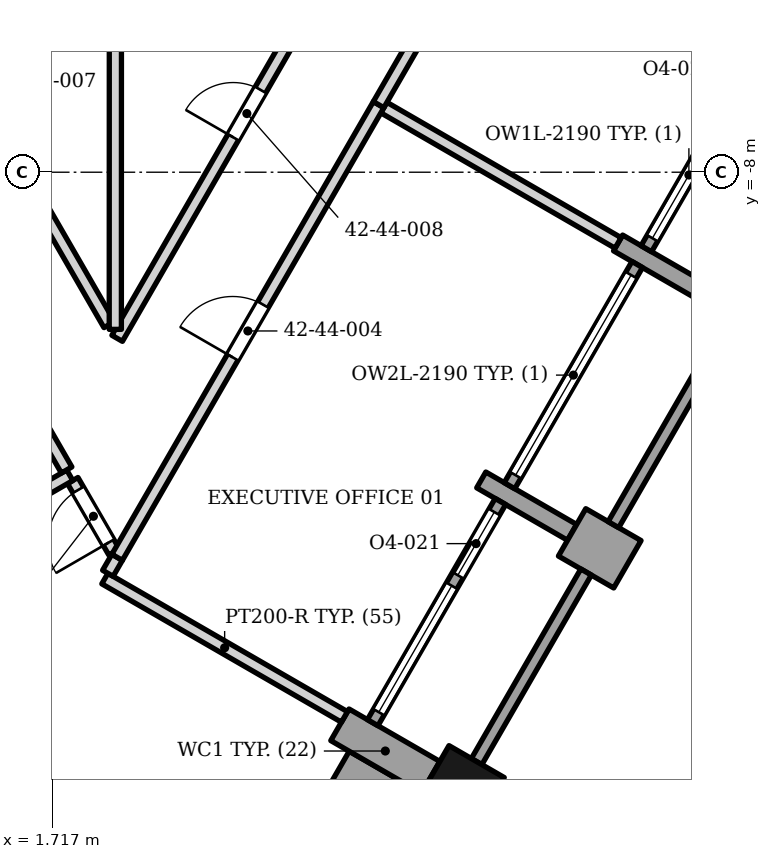
"""IFC4 building model, lengths in metres.
Left out: names, types, materials, properties, quantities, classifications, styles, units other than length and angle.
Written with IfcOpenShell. Run it as: python <this file> out.ifc"""

import sys

from ifc_helpers import new_model, si_unit, direction, frame, frame_2d, origin, origin_2d, place, context, subcontext, project, spatial, rectangle, extrude, element, fill, save


model = new_model("IFC4")
c1 = context("Model", 3, precision=1e-05, world=origin(), true_north=direction((0.0, 1.0)))
c2 = subcontext(c1, "Body", "Model", "MODEL_VIEW")
j1 = project(units=[si_unit("LENGTHUNIT", "METRE"), si_unit("PLANEANGLEUNIT", "RADIAN")], contexts=[c1])
p1 = place(None, origin())
s1 = spatial("IfcSite", under=j1, at=p1, CompositionType="ELEMENT")
p2 = place(p1, origin())
s2 = spatial("IfcBuilding", under=s1, at=p2, CompositionType="ELEMENT")
p3 = place(p2, frame((0.0, 0.0, 179.7)))
s3 = spatial("IfcBuildingStorey", under=s2, at=p3, CompositionType="ELEMENT", Elevation=179.7)
p4 = place(p3, frame((8.472, -18.082, 0.0), z_axis=(0.0, 0.0, 1.0), x_axis=(0.5, 0.866025403784, 0.0)))
e1 = element("IfcColumn", 1, at=p4, inside=s3, PredefinedType="COLUMN", context=c2, shape_type="SweptSolid", body=[
    extrude(rectangle(XDim=0.9, YDim=1.05, at=origin_2d()), origin(), (0.0, 0.0, 1.0), 3.9),
])
p5 = place(p3, frame((7.942, -17.95, 0.0), z_axis=(0.0, 0.0, 1.0), x_axis=(-0.866013532718, 0.500020560727, 0.0)))
e2 = element("IfcWall", 2, at=p5, inside=s3, PredefinedType="SOLIDWALL", context=c2, shape_type="SweptSolid", body=[
    extrude(rectangle(XDim=1.725, YDim=0.6, at=frame_2d((0.863, 0.0))), origin(), (0.0, 0.0, 1.0), 3.0),
])
p6 = place(p3, frame((11.176, -14.448, 0.0), z_axis=(0.0, 0.0, 1.0), x_axis=(-0.866030680601, 0.499990860175, 0.0)))
e3 = element("IfcWall", 3, at=p6, inside=s3, PredefinedType="SOLIDWALL", context=c2, shape_type="SweptSolid", body=[
    extrude(rectangle(XDim=1.05, YDim=0.9, at=frame_2d((0.525, 0.0))), origin(), (0.0, 0.0, 1.0), 3.0),
])
p7 = place(p3, frame((10.267, -13.923, 0.0), z_axis=(0.0, 0.0, 1.0), x_axis=(-0.866013532718, 0.500020560727, 0.0)))
e4 = element("IfcWall", 4, at=p7, inside=s3, PredefinedType="SOLIDWALL", context=c2, shape_type="SweptSolid", body=[
    extrude(rectangle(XDim=1.725, YDim=0.3, at=frame_2d((0.863, 0.0))), origin(), (0.0, 0.0, 1.0), 3.0),
])
p8 = place(p3, frame((12.517, -10.026, 0.0), z_axis=(0.0, 0.0, 1.0), x_axis=(-0.866013532718, 0.500020560727, 0.0)))
e5 = element("IfcWall", 5, at=p8, inside=s3, PredefinedType="SOLIDWALL", context=c2, shape_type="SweptSolid", body=[
    extrude(rectangle(XDim=1.725, YDim=0.3, at=frame_2d((0.863, 0.0))), origin(), (0.0, 0.0, 1.0), 2.742),
])
p9 = place(p3, frame((8.697, -17.693, 0.0), z_axis=(0.0, 0.0, 1.0), x_axis=(0.499961193289, 0.866047807691, 0.0)))
e6 = element("IfcWall", 6, at=p9, inside=s3, PredefinedType="SOLIDWALL", context=c2, shape_type="SweptSolid", body=[
    extrude(rectangle(XDim=3.6, YDim=0.2, at=frame_2d((1.8, 0.0))), origin(), (0.0, 0.0, 1.0), 3.0),
])
p10 = place(p3, frame((6.988, -17.052, 0.0), z_axis=(0.0, 0.0, 1.0), x_axis=(0.500027713859, 0.866009402589, 0.0)))
e7 = element("IfcWall", 7, at=p10, inside=s3, PredefinedType="ELEMENTEDWALL", context=c2, shape_type="SweptSolid", body=[
    extrude(rectangle(XDim=4.2, YDim=0.2, at=frame_2d((2.1, 0.0))), origin(), (0.0, 0.0, 1.0), 3.0),
])
p11 = place(p10, frame((0.2, 0.0, 0.45)))
e8 = element("IfcOpeningElement", 8, at=p11, cuts=e7, PredefinedType="OPENING", context=c2, shape_type="SweptSolid", body=[
    extrude(rectangle(XDim=2.4, YDim=2.25, at=frame_2d((1.2, 1.125))), frame((0.0, 0.11, 0.0), z_axis=(0.0, -1.0, 0.0), x_axis=(1.0, 0.0, 0.0)), (0.0, 0.0, 1.0), 0.22),
])
p12 = place(p10, frame((2.8, 0.0, 0.0)))
e9 = element("IfcOpeningElement", 9, at=p12, cuts=e7, PredefinedType="OPENING", context=c2, shape_type="SweptSolid", body=[
    extrude(rectangle(XDim=1.2, YDim=2.7, at=frame_2d((0.6, 1.35))), frame((0.0, 0.11, 0.0), z_axis=(0.0, -1.0, 0.0), x_axis=(1.0, 0.0, 0.0)), (0.0, 0.0, 1.0), 0.22),
])
p13 = place(p3, frame((10.947, -13.795, 0.0), z_axis=(0.0, 0.0, 1.0), x_axis=(0.499961193289, 0.866047807691, 0.0)))
e10 = element("IfcWall", 10, at=p13, inside=s3, PredefinedType="SOLIDWALL", context=c2, shape_type="SweptSolid", body=[
    extrude(rectangle(XDim=3.6, YDim=0.2, at=frame_2d((1.8, 0.0))), origin(), (0.0, 0.0, 1.0), 3.0),
])
p14 = place(p3, frame((9.238, -13.155, 0.0), z_axis=(0.0, 0.0, 1.0), x_axis=(0.500002543286, 0.866023935413, 0.0)))
e11 = element("IfcWall", 11, at=p14, inside=s3, PredefinedType="ELEMENTEDWALL", context=c2, shape_type="SweptSolid", body=[
    extrude(rectangle(XDim=4.2, YDim=0.2, at=frame_2d((2.1, 0.0))), origin(), (0.0, 0.0, 1.0), 2.742),
])
p15 = place(p14, frame((0.2, 0.0, 0.45)))
e12 = element("IfcOpeningElement", 12, at=p15, cuts=e11, PredefinedType="OPENING", context=c2, shape_type="SweptSolid", body=[
    extrude(rectangle(XDim=3.8, YDim=2.19, at=frame_2d((1.9, 1.095))), frame((0.0, 0.11, 0.0), z_axis=(0.0, -1.0, 0.0), x_axis=(1.0, 0.0, 0.0)), (0.0, 0.0, 1.0), 0.22),
])
p16 = place(p3, frame((11.488, -9.258, 0.0), z_axis=(0.0, 0.0, 1.0), x_axis=(0.500027713859, 0.866009402589, 0.0)))
e13 = element("IfcWall", 13, at=p16, inside=s3, PredefinedType="ELEMENTEDWALL", context=c2, shape_type="SweptSolid", body=[
    extrude(rectangle(XDim=4.2, YDim=0.2, at=frame_2d((2.1, 0.0))), origin(), (0.0, 0.0, 1.0), 2.742),
])
p17 = place(p16, frame((0.2, 0.0, 0.45)))
e14 = element("IfcOpeningElement", 14, at=p17, cuts=e13, PredefinedType="OPENING", context=c2, shape_type="SweptSolid", body=[
    extrude(rectangle(XDim=2.4, YDim=2.19, at=frame_2d((1.2, 1.095))), frame((0.0, 0.11, 0.0), z_axis=(0.0, -1.0, 0.0), x_axis=(1.0, 0.0, 0.0)), (0.0, 0.0, 1.0), 0.22),
])
p18 = place(p16, frame((2.8, 0.0, 0.0)))
e15 = element("IfcOpeningElement", 15, at=p18, cuts=e13, PredefinedType="OPENING", context=c2, shape_type="SweptSolid", body=[
    extrude(rectangle(XDim=1.2, YDim=2.64, at=frame_2d((0.6, 1.32))), frame((0.0, 0.11, 0.0), z_axis=(0.0, -1.0, 0.0), x_axis=(1.0, 0.0, 0.0)), (0.0, 0.0, 1.0), 0.22),
])
p19 = place(p3, frame((8.489, -19.102, 0.0), z_axis=(0.0, 0.0, 1.0), x_axis=(-0.866041403502, 0.499972286653, 0.0)))
e16 = element("IfcWall", 16, at=p19, inside=s3, PredefinedType="SOLIDWALL", context=c2, shape_type="SweptSolid", body=[
    extrude(rectangle(XDim=2.425, YDim=0.85, at=frame_2d((1.212, 0.0))), origin(), (0.0, 0.0, 1.0), 3.0),
])
p20 = place(p3, frame((2.583, -14.683, 0.0), z_axis=(0.0, 0.0, 1.0), x_axis=(0.866012237902, -0.500022803284, 0.0)))
e17 = element("IfcWall", 17, at=p20, inside=s3, PredefinedType="PARTITIONING", context=c2, shape_type="SweptSolid", body=[
    extrude(rectangle(XDim=4.55, YDim=0.2, at=frame_2d((2.275, 0.0))), origin(), (0.0, 0.0, 1.0), 2.884),
])
p21 = place(p3, frame((2.632, -14.596, 0.0), z_axis=(0.0, 0.0, 1.0), x_axis=(0.499074005857, 0.866559367082, 0.0)))
e18 = element("IfcWall", 18, at=p21, inside=s3, PredefinedType="PARTITIONING", context=c2, shape_type="SweptSolid", body=[
    extrude(rectangle(XDim=0.304, YDim=0.2, at=frame_2d((0.152, 0.0))), origin(), (0.0, 0.0, 1.0), 3.73),
])
p22 = place(p3, frame((2.054, -13.07, 0.0), z_axis=(0.0, 0.0, 1.0), x_axis=(0.500759821175, -0.865586276172, 0.0)))
e19 = element("IfcWall", 19, at=p22, inside=s3, PredefinedType="PARTITIONING", context=c2, shape_type="SweptSolid", body=[
    extrude(rectangle(XDim=1.358, YDim=0.2, at=frame_2d((0.679, 0.0))), origin(), (0.0, 0.0, 1.0), 2.884),
])
p23 = place(p22, frame((0.179, 0.0, 0.0)))
e20 = element("IfcOpeningElement", 20, at=p23, cuts=e19, PredefinedType="OPENING", context=c2, shape_type="SweptSolid", body=[
    extrude(rectangle(XDim=1.0, YDim=2.1, at=frame_2d((0.5, 1.05))), frame((0.0, 0.11, 0.0), z_axis=(0.0, -1.0, 0.0), x_axis=(1.0, 0.0, 0.0)), (0.0, 0.0, 1.0), 0.22),
])
p24 = place(p3, frame((-4.879, -16.958, 0.0), z_axis=(0.0, 0.0, 1.0), x_axis=(0.866110929286, 0.499851836219, 0.0)))
e21 = element("IfcWall", 21, at=p24, inside=s3, PredefinedType="PARTITIONING", context=c2, shape_type="SweptSolid", body=[
    extrude(rectangle(XDim=7.95, YDim=0.2, at=frame_2d((3.975, 0.0))), origin(), (0.0, 0.0, 1.0), 2.884),
])
p25 = place(p3, frame((2.785, -10.732, 0.0), z_axis=(0.0, 0.0, 1.0), x_axis=(0.499820110187, 0.866129238309, 0.0)))
e22 = element("IfcWall", 22, at=p25, inside=s3, PredefinedType="PARTITIONING", context=c2, shape_type="SweptSolid", body=[
    extrude(rectangle(XDim=16.664, YDim=0.2, at=frame_2d((8.332, 0.0))), origin(), (0.0, 0.0, 1.0), 2.742),
])
p26 = place(p25, frame((3.818, 0.0, 0.0)))
e23 = element("IfcOpeningElement", 23, at=p26, cuts=e22, PredefinedType="OPENING", context=c2, shape_type="SweptSolid", body=[
    extrude(rectangle(XDim=0.9, YDim=2.1, at=frame_2d((0.45, 1.05))), frame((0.0, 0.11, 0.0), z_axis=(0.0, -1.0, 0.0), x_axis=(1.0, 0.0, 0.0)), (0.0, 0.0, 1.0), 0.22),
])
p27 = place(p25, frame((12.1, 0.0, 0.0)))
e24 = element("IfcOpeningElement", 24, at=p27, cuts=e22, PredefinedType="OPENING", context=c2, shape_type="SweptSolid", body=[
    extrude(rectangle(XDim=1.0, YDim=2.1, at=frame_2d((0.5, 1.05))), frame((0.0, 0.11, 0.0), z_axis=(0.0, -1.0, 0.0), x_axis=(1.0, 0.0, 0.0)), (0.0, 0.0, 1.0), 0.22),
])
p28 = place(p3, frame((-0.245, -9.088, 0.0), z_axis=(0.0, 0.0, 1.0), x_axis=(0.500013981145, -0.866017331616, 0.0)))
e25 = element("IfcWall", 25, at=p28, inside=s3, PredefinedType="PARTITIONING", context=c2, shape_type="SweptSolid", body=[
    extrude(rectangle(XDim=4.398, YDim=0.2, at=frame_2d((2.199, 0.0))), origin(), (0.0, 0.0, 1.0), 2.742),
])
p29 = place(p28, frame((0.871, 0.0, 0.0)))
e26 = element("IfcOpeningElement", 26, at=p29, cuts=e25, PredefinedType="OPENING", context=c2, shape_type="SweptSolid", body=[
    extrude(rectangle(XDim=0.9, YDim=2.1, at=frame_2d((0.45, 1.05))), frame((0.0, 0.11, 0.0), z_axis=(0.0, -1.0, 0.0), x_axis=(1.0, 0.0, 0.0)), (0.0, 0.0, 1.0), 0.22),
])
p30 = place(p3, frame((7.17, -6.936, 0.0), z_axis=(0.0, 0.0, 1.0), x_axis=(0.865815424907, -0.500363517848, 0.0)))
e27 = element("IfcWall", 27, at=p30, inside=s3, PredefinedType="PARTITIONING", context=c2, shape_type="SweptSolid", body=[
    extrude(rectangle(XDim=4.45, YDim=0.2, at=frame_2d((2.225, 0.0))), origin(), (0.0, 0.0, 1.0), 2.742),
])
p31 = place(p3, frame((2.784, -14.333, 0.0), z_axis=(0.0, 0.0, 1.0), x_axis=(0.500204257301, 0.865907443656, 0.0)))
e28 = element("IfcWall", 28, at=p31, inside=s3, PredefinedType="PARTITIONING", context=c2, shape_type="SweptSolid", body=[
    extrude(rectangle(XDim=8.597, YDim=0.2, at=frame_2d((4.298, 0.0))), origin(), (0.0, 0.0, 1.0), 2.742),
])
p32 = place(p31, frame((3.799, 0.0, 0.0)))
e29 = element("IfcOpeningElement", 29, at=p32, cuts=e28, PredefinedType="OPENING", context=c2, shape_type="SweptSolid", body=[
    extrude(rectangle(XDim=1.0, YDim=2.4, at=frame_2d((0.5, 1.2))), frame((0.0, 0.11, 0.0), z_axis=(0.0, -1.0, 0.0), x_axis=(1.0, 0.0, 0.0)), (0.0, 0.0, 1.0), 0.22),
])
p33 = place(p3, frame((-1.48, -3.342, 0.0), z_axis=(0.0, 0.0, 1.0), x_axis=(0.499828066166, -0.866124647076, 0.0)))
e30 = element("IfcWall", 30, at=p33, inside=s3, PredefinedType="PARTITIONING", context=c2, shape_type="SweptSolid", body=[
    extrude(rectangle(XDim=8.271, YDim=0.2, at=frame_2d((4.136, 0.0))), origin(), (0.0, 0.0, 1.0), 2.742),
])
p34 = place(p33, frame((3.784, 0.0, 0.0)))
e31 = element("IfcOpeningElement", 31, at=p34, cuts=e30, PredefinedType="OPENING", context=c2, shape_type="SweptSolid", body=[
    extrude(rectangle(XDim=0.9, YDim=2.1, at=frame_2d((0.45, 1.05))), frame((0.0, 0.11, 0.0), z_axis=(0.0, -1.0, 0.0), x_axis=(1.0, 0.0, 0.0)), (0.0, 0.0, 1.0), 0.22),
])
p35 = place(p3, frame((7.085, -6.889, 0.0), z_axis=(0.0, 0.0, 1.0), x_axis=(0.499981539608, 0.866036061634, 0.0)))
e32 = element("IfcWall", 32, at=p35, inside=s3, PredefinedType="PARTITIONING", context=c2, shape_type="SweptSolid", body=[
    extrude(rectangle(XDim=9.0, YDim=0.2, at=frame_2d((4.5, 0.0))), origin(), (0.0, 0.0, 1.0), 2.742),
])
p36 = place(p35, frame((4.0, 0.0, 0.0)))
e33 = element("IfcOpeningElement", 33, at=p36, cuts=e32, PredefinedType="OPENING", context=c2, shape_type="SweptSolid", body=[
    extrude(rectangle(XDim=1.0, YDim=2.1, at=frame_2d((0.5, 1.05))), frame((0.0, 0.11, 0.0), z_axis=(0.0, -1.0, 0.0), x_axis=(1.0, 0.0, 0.0)), (0.0, 0.0, 1.0), 0.22),
])
p37 = place(p3, frame((2.754, -10.584, 0.0), z_axis=(0.0, 0.0, 1.0), x_axis=(0.00025119316, 0.999999968451, 0.0)))
e34 = element("IfcWall", 34, at=p37, inside=s3, PredefinedType="PARTITIONING", context=c2, shape_type="SweptSolid", body=[
    extrude(rectangle(XDim=12.635, YDim=0.2, at=frame_2d((6.317, 0.0))), origin(), (0.0, 0.0, 1.0), 3.73),
])
p38 = place(p11, origin())
e35 = element("IfcWindow", 35, at=p38, inside=s3, PartitioningType="SINGLE_PANEL", PredefinedType="WINDOW", context=c2, shape_type="SweptSolid", body=[
    extrude(rectangle(XDim=2.4, YDim=2.25, at=frame_2d((1.2, 1.125))), frame((0.0, 0.03, 0.0), z_axis=(0.0, -1.0, 0.0), x_axis=(1.0, 0.0, 0.0)), (0.0, 0.0, 1.0), 0.06),
])
fill(e8, e35)
p39 = place(p12, origin())
e36 = element("IfcDoor", 36, at=p39, inside=s3, OperationType="SINGLE_SWING_LEFT", PredefinedType="DOOR", context=c2, shape_type="SweptSolid", body=[
    extrude(rectangle(XDim=1.2, YDim=2.7, at=frame_2d((0.6, 1.35))), frame((0.0, 0.025, 0.0), z_axis=(0.0, -1.0, 0.0), x_axis=(1.0, 0.0, 0.0)), (0.0, 0.0, 1.0), 0.05),
])
fill(e9, e36)
p40 = place(p15, origin())
e37 = element("IfcWindow", 37, at=p40, inside=s3, PartitioningType="SINGLE_PANEL", PredefinedType="WINDOW", context=c2, shape_type="SweptSolid", body=[
    extrude(rectangle(XDim=3.8, YDim=2.19, at=frame_2d((1.9, 1.095))), frame((0.0, 0.03, 0.0), z_axis=(0.0, -1.0, 0.0), x_axis=(1.0, 0.0, 0.0)), (0.0, 0.0, 1.0), 0.06),
])
fill(e12, e37)
p41 = place(p17, origin())
e38 = element("IfcWindow", 38, at=p41, inside=s3, PartitioningType="SINGLE_PANEL", PredefinedType="WINDOW", context=c2, shape_type="SweptSolid", body=[
    extrude(rectangle(XDim=2.4, YDim=2.19, at=frame_2d((1.2, 1.095))), frame((0.0, 0.03, 0.0), z_axis=(0.0, -1.0, 0.0), x_axis=(1.0, 0.0, 0.0)), (0.0, 0.0, 1.0), 0.06),
])
fill(e14, e38)
p42 = place(p32, origin())
e39 = element("IfcDoor", 39, at=p42, inside=s3, OperationType="SINGLE_SWING_LEFT", PredefinedType="DOOR", context=c2, shape_type="SweptSolid", body=[
    extrude(rectangle(XDim=1.0, YDim=2.4, at=frame_2d((0.5, 1.2))), frame((0.0, 0.025, 0.0), z_axis=(0.0, -1.0, 0.0), x_axis=(1.0, 0.0, 0.0)), (0.0, 0.0, 1.0), 0.05),
])
fill(e29, e39)
p43 = place(p26, origin())
e40 = element("IfcDoor", 40, at=p43, inside=s3, OperationType="SINGLE_SWING_LEFT", PredefinedType="DOOR", context=c2, shape_type="SweptSolid", body=[
    extrude(rectangle(XDim=0.9, YDim=2.1, at=frame_2d((0.45, 1.05))), frame((0.0, 0.025, 0.0), z_axis=(0.0, -1.0, 0.0), x_axis=(1.0, 0.0, 0.0)), (0.0, 0.0, 1.0), 0.05),
])
fill(e23, e40)
p44 = place(p23, origin())
e41 = element("IfcDoor", 41, at=p44, inside=s3, OperationType="SINGLE_SWING_RIGHT", PredefinedType="DOOR", context=c2, shape_type="SweptSolid", body=[
    extrude(rectangle(XDim=1.0, YDim=2.1, at=frame_2d((0.5, 1.05))), frame((0.0, 0.025, 0.0), z_axis=(0.0, -1.0, 0.0), x_axis=(1.0, 0.0, 0.0)), (0.0, 0.0, 1.0), 0.05),
])
fill(e20, e41)
save(model, sys.argv[1])
